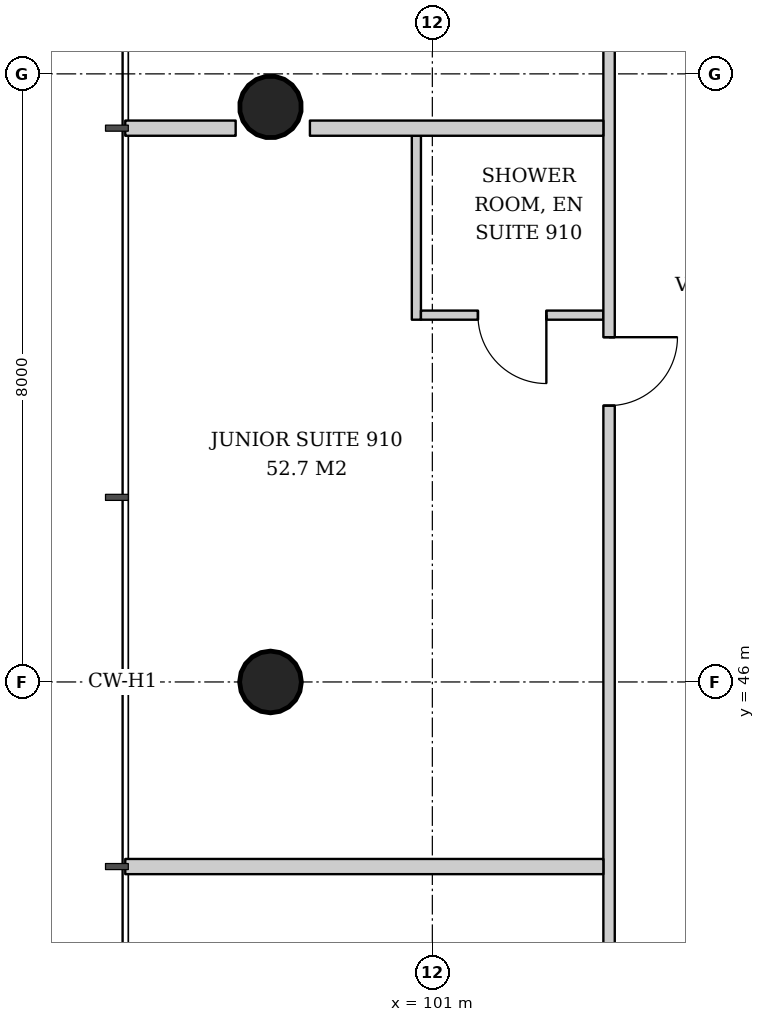
"""IFC4 building model, lengths in metres.
Left out: names, types, materials, properties, quantities, classifications, styles, units other than length and angle.
Written with IfcOpenShell. Run it as: python <this file> out.ifc"""

import sys

from ifc_helpers import new_model, si_unit, direction, frame, frame_2d, origin, origin_2d, place, context, subcontext, project, spatial, rectangle, hollow_circle, extrude, element, fill, save


model = new_model("IFC4")
c1 = context("Model", 3, precision=1e-05, world=origin(), true_north=direction((0.0, 1.0)))
c2 = subcontext(c1, "Body", "Model", "MODEL_VIEW")
j1 = project(units=[si_unit("LENGTHUNIT", "METRE"), si_unit("PLANEANGLEUNIT", "RADIAN")], contexts=[c1])
p1 = place(None, origin())
s1 = spatial("IfcSite", under=j1, at=p1, CompositionType="ELEMENT")
p2 = place(p1, origin())
s2 = spatial("IfcBuilding", under=s1, at=p2, CompositionType="ELEMENT")
p3 = place(p2, frame((0.0, 0.0, 40.0)))
s3 = spatial("IfcBuildingStorey", under=s2, at=p3, CompositionType="ELEMENT", Elevation=40.0)
p4 = place(p3, frame((98.819, 53.591, 0.0), z_axis=(0.043059525333, -0.021561848751, 0.998839808957), x_axis=(0.44774654769, 0.894160516368, 0.0)))
e1 = element("IfcColumn", 1, at=p4, inside=s3, PredefinedType="COLUMN", context=c2, shape_type="SweptSolid", body=[
    extrude(hollow_circle(Radius=0.406, WallThickness=0.03, at=origin_2d()), origin(), (0.0, 0.0, 1.0), 3.804),
])
p5 = place(p3, frame((98.819, 46.0, 0.0), z_axis=(0.043069538298, 0.0, 0.999072076915), x_axis=(0.0, 1.0, 0.0)))
e2 = element("IfcColumn", 2, at=p5, inside=s3, PredefinedType="COLUMN", context=c2, shape_type="SweptSolid", body=[
    extrude(hollow_circle(Radius=0.406, WallThickness=0.03, at=origin_2d()), origin(), (0.0, 0.0, 1.0), 3.803),
])
p6 = place(p3, frame((100.79, 53.186, 0.0), z_axis=(0.0, 0.0, 1.0), x_axis=(0.0, -1.0, 0.0)))
e3 = element("IfcWall", 3, at=p6, inside=s3, PredefinedType="PARTITIONING", context=c2, shape_type="SweptSolid", body=[
    extrude(rectangle(XDim=2.42, YDim=0.12, at=frame_2d((1.21, 0.0))), origin(), (0.0, 0.0, 1.0), 2.847),
])
p7 = place(p3, frame((103.25, 50.826, 0.0), z_axis=(0.0, 0.0, 1.0), x_axis=(-1.0, 0.0, 0.0)))
e4 = element("IfcWall", 4, at=p7, inside=s3, PredefinedType="PARTITIONING", context=c2, shape_type="SweptSolid", body=[
    extrude(rectangle(XDim=2.4, YDim=0.12, at=frame_2d((1.2, 0.0))), origin(), (0.0, 0.0, 1.0), 2.847),
])
p8 = place(p7, frame((0.75, 0.0, 0.0)))
e5 = element("IfcOpeningElement", 5, at=p8, cuts=e4, PredefinedType="OPENING", context=c2, shape_type="SweptSolid", body=[
    extrude(rectangle(XDim=0.9, YDim=2.1, at=frame_2d((0.45, 1.05))), frame((0.0, 0.07, 0.0), z_axis=(0.0, -1.0, 0.0), x_axis=(1.0, 0.0, 0.0)), (0.0, 0.0, 1.0), 0.14),
])
p9 = place(p3, frame((103.325, 60.294, 0.0), z_axis=(0.0, 0.0, 1.0), x_axis=(0.0, -1.0, 0.0)))
e6 = element("IfcWall", 6, at=p9, inside=s3, PredefinedType="PARTITIONING", context=c2, shape_type="SweptSolid", body=[
    extrude(rectangle(XDim=28.589, YDim=0.15, at=frame_2d((14.294, 0.0))), origin(), (0.0, 0.0, 1.0), 2.8),
])
p10 = place(p9, frame((0.923, 0.0, 0.0)))
e7 = element("IfcOpeningElement", 7, at=p10, cuts=e6, PredefinedType="OPENING", context=c2, shape_type="SweptSolid", body=[
    extrude(rectangle(XDim=0.9, YDim=2.1, at=frame_2d((0.45, 1.05))), frame((0.0, 0.085, 0.0), z_axis=(0.0, -1.0, 0.0), x_axis=(1.0, 0.0, 0.0)), (0.0, 0.0, 1.0), 0.17),
])
p11 = place(p9, frame((4.852, 0.0, 0.0)))
e8 = element("IfcOpeningElement", 8, at=p11, cuts=e6, PredefinedType="OPENING", context=c2, shape_type="SweptSolid", body=[
    extrude(rectangle(XDim=1.0, YDim=2.1, at=frame_2d((0.5, 1.05))), frame((0.0, 0.085, 0.0), z_axis=(0.0, -1.0, 0.0), x_axis=(1.0, 0.0, 0.0)), (0.0, 0.0, 1.0), 0.17),
])
p12 = place(p9, frame((9.759, 0.0, 0.0)))
e9 = element("IfcOpeningElement", 9, at=p12, cuts=e6, PredefinedType="OPENING", context=c2, shape_type="SweptSolid", body=[
    extrude(rectangle(XDim=0.9, YDim=2.1, at=frame_2d((0.45, 1.05))), frame((0.0, 0.085, 0.0), z_axis=(0.0, -1.0, 0.0), x_axis=(1.0, 0.0, 0.0)), (0.0, 0.0, 1.0), 0.17),
])
p13 = place(p9, frame((17.93, 0.0, 0.0)))
e10 = element("IfcOpeningElement", 10, at=p13, cuts=e6, PredefinedType="OPENING", context=c2, shape_type="SweptSolid", body=[
    extrude(rectangle(XDim=0.9, YDim=2.1, at=frame_2d((0.45, 1.05))), frame((0.0, 0.085, 0.0), z_axis=(0.0, -1.0, 0.0), x_axis=(1.0, 0.0, 0.0)), (0.0, 0.0, 1.0), 0.17),
])
p14 = place(p9, frame((24.33, 0.0, 0.0)))
e11 = element("IfcOpeningElement", 11, at=p14, cuts=e6, PredefinedType="OPENING", context=c2, shape_type="SweptSolid", body=[
    extrude(rectangle(XDim=0.9, YDim=2.1, at=frame_2d((0.45, 1.05))), frame((0.0, 0.085, 0.0), z_axis=(0.0, -1.0, 0.0), x_axis=(1.0, 0.0, 0.0)), (0.0, 0.0, 1.0), 0.17),
])
p15 = place(p3, frame((103.25, 53.286, 0.0), z_axis=(0.0, 0.0, 1.0), x_axis=(-1.0, 0.0, 0.0)))
e12 = element("IfcWall", 12, at=p15, inside=s3, PredefinedType="PARTITIONING", context=c2, shape_type="SweptSolid", body=[
    extrude(rectangle(XDim=3.861, YDim=0.2, at=frame_2d((1.93, 0.0))), origin(), (0.0, 0.0, 1.0), 3.6),
])
p16 = place(p3, frame((98.412, 53.286, 0.0), z_axis=(0.0, 0.0, 1.0), x_axis=(-1.0, 0.0, 0.0)))
e13 = element("IfcWall", 13, at=p16, inside=s3, PredefinedType="PARTITIONING", context=c2, shape_type="SweptSolid", body=[
    extrude(rectangle(XDim=1.452, YDim=0.2, at=frame_2d((0.726, 0.0))), origin(), (0.0, 0.0, 1.0), 3.6),
])
p17 = place(p3, frame((103.25, 43.572, 0.0), z_axis=(0.0, 0.0, 1.0), x_axis=(-1.0, 0.0, 0.0)))
e14 = element("IfcWall", 14, at=p17, inside=s3, PredefinedType="PARTITIONING", context=c2, shape_type="SweptSolid", body=[
    extrude(rectangle(XDim=6.29, YDim=0.2, at=frame_2d((3.145, 0.0))), origin(), (0.0, 0.0, 1.0), 3.05),
])
p18 = place(p8, origin())
e15 = element("IfcDoor", 15, at=p18, inside=s3, OperationType="SINGLE_SWING_LEFT", PredefinedType="DOOR", context=c2, shape_type="SweptSolid", body=[
    extrude(rectangle(XDim=0.9, YDim=2.1, at=frame_2d((0.45, 1.05))), frame((0.0, 0.025, 0.0), z_axis=(0.0, -1.0, 0.0), x_axis=(1.0, 0.0, 0.0)), (0.0, 0.0, 1.0), 0.05),
])
fill(e5, e15)
p19 = place(p12, origin())
e16 = element("IfcDoor", 16, at=p19, inside=s3, OperationType="SINGLE_SWING_LEFT", PredefinedType="DOOR", context=c2, shape_type="SweptSolid", body=[
    extrude(rectangle(XDim=0.9, YDim=2.1, at=frame_2d((0.45, 1.05))), frame((0.0, 0.025, 0.0), z_axis=(0.0, -1.0, 0.0), x_axis=(1.0, 0.0, 0.0)), (0.0, 0.0, 1.0), 0.05),
])
fill(e9, e16)
save(model, sys.argv[1])
